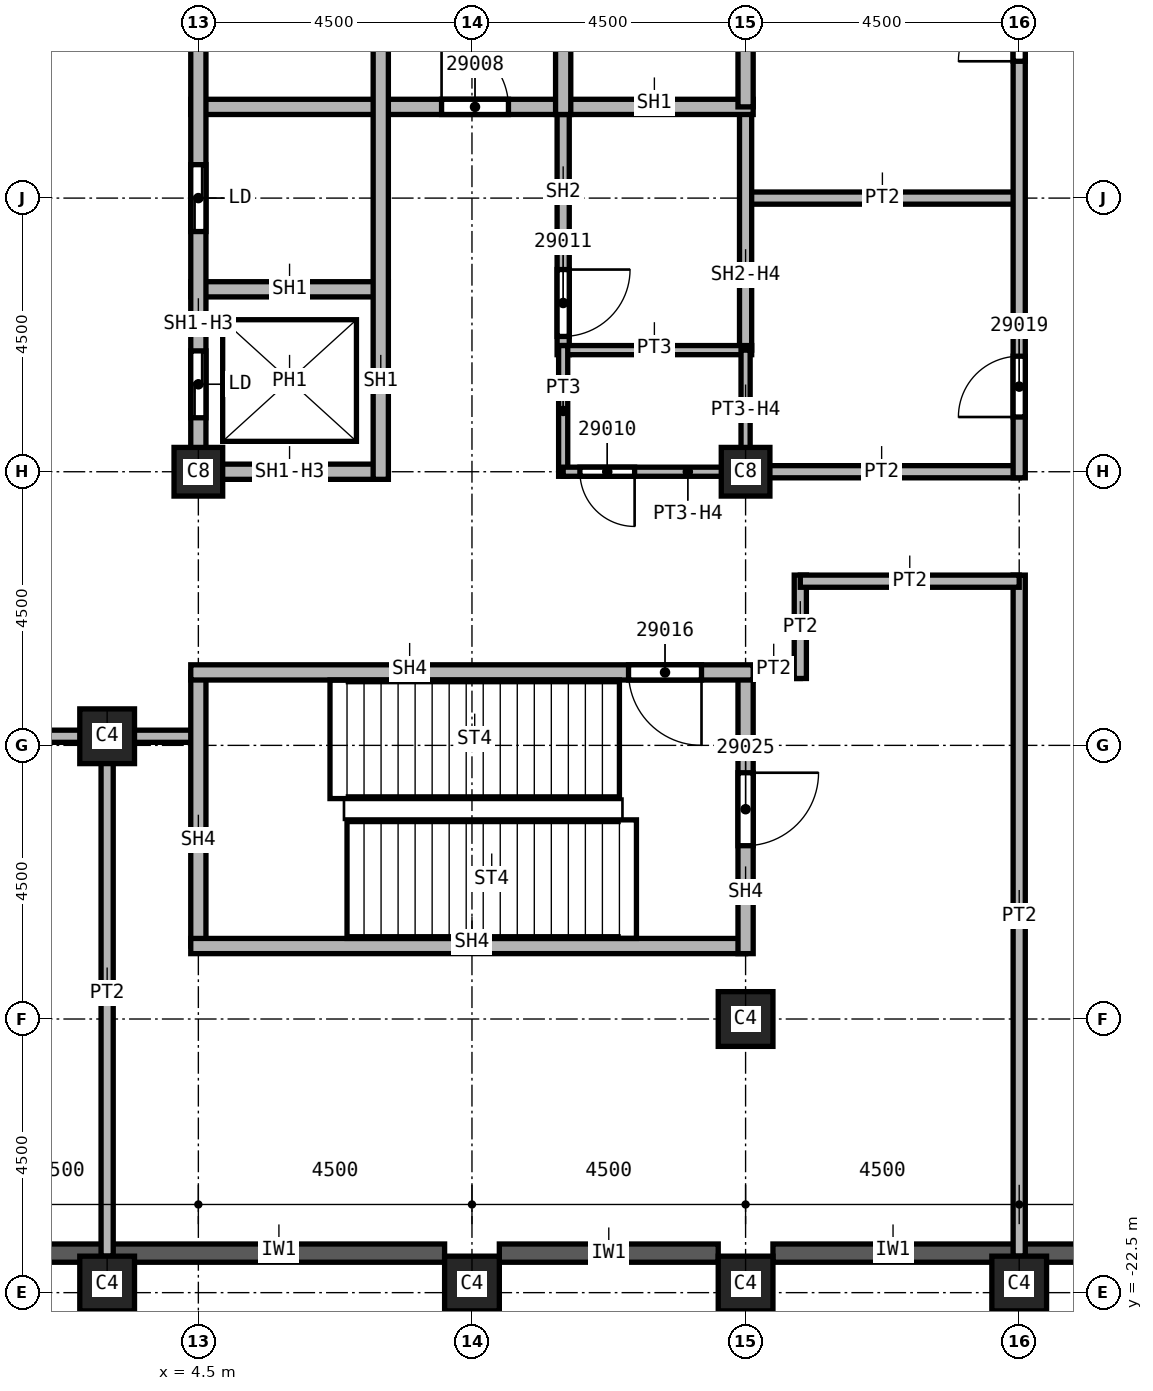
"""IFC4 building model, lengths in metres.
Left out: names, types, materials, properties, quantities, classifications, styles, units other than length and angle.
Written with IfcOpenShell. Run it as: python <this file> out.ifc"""

import sys

from ifc_helpers import new_model, si_unit, direction, frame, frame_2d, origin, origin_2d, place, context, subcontext, project, spatial, rectangle, extrude, element, fill, save


model = new_model("IFC4")
c1 = context("Model", 3, precision=1e-05, world=origin(), true_north=direction((0.0, 1.0)))
c2 = subcontext(c1, "Body", "Model", "MODEL_VIEW")
j1 = project(units=[si_unit("LENGTHUNIT", "METRE"), si_unit("PLANEANGLEUNIT", "RADIAN")], contexts=[c1])
p1 = place(None, origin())
s1 = spatial("IfcSite", under=j1, at=p1, CompositionType="ELEMENT")
p2 = place(p1, origin())
s2 = spatial("IfcBuilding", under=s1, at=p2, CompositionType="ELEMENT")
p3 = place(p2, frame((0.0, 0.0, 294.0)))
s3 = spatial("IfcBuildingStorey", under=s2, at=p3, CompositionType="ELEMENT", Elevation=294.0)
p4 = place(p3, frame((13.5, -18.0, 0.0), z_axis=(0.0, 0.0, 1.0), x_axis=(1.0, 0.0, 0.0)))
e1 = element("IfcColumn", 1, at=p4, inside=s3, PredefinedType="COLUMN", context=c2, shape_type="SweptSolid", body=[
    extrude(rectangle(XDim=0.9, YDim=0.9, at=origin_2d()), origin(), (0.0, 0.0, 1.0), 5.74),
])
for number, where, z_axis, x_axis in (
    (2, (4.5, -9.0, 0.0), (0.0, 0.0, 1.0), (1.0, 0.0, 0.0)),
    (3, (13.5, -9.0, 0.0), (0.0, 0.0, 1.0), (1.0, 0.0, 0.0)),
):
    element("IfcColumn", number, at=place(p3, frame(where, z_axis=z_axis, x_axis=x_axis)), inside=s3, PredefinedType="COLUMN", context=c2, shape_type="SweptSolid", body=[
        extrude(rectangle(XDim=0.8, YDim=0.8, at=origin_2d()), origin(), (0.0, 0.0, 1.0), 5.74),
    ])
for number, where, z_axis, x_axis in (
    (4, (3.0, -22.35, 0.0), (0.0, -0.18, 0.984), (1.0, 0.0, 0.0)),
    (5, (9.0, -22.35, 0.0), (0.0, -0.18, 0.984), (1.0, 0.0, 0.0)),
    (6, (13.5, -22.35, 0.0), (0.0, -0.18, 0.984), (1.0, 0.0, 0.0)),
    (7, (18.0, -22.35, 0.0), (0.0, -0.18, 0.984), (1.0, 0.0, 0.0)),
    (8, (3.0, -13.35, 0.0), (0.0, -0.18, 0.984), (1.0, 0.0, 0.0)),
):
    element("IfcColumn", number, at=place(p3, frame(where, z_axis=z_axis, x_axis=x_axis)), inside=s3, PredefinedType="COLUMN", context=c2, shape_type="SweptSolid", body=[
        extrude(rectangle(XDim=0.9, YDim=0.9, at=origin_2d()), origin(), (0.0, 0.0, 1.0), 5.835),
    ])
for number, where, z_axis, x_axis in (
    (9, (-2.55, -21.85, 0.0), (0.0, 0.0, 1.0), (1.0, 0.0, 0.0)),
    (10, (3.05, -21.85, 0.0), (0.0, 0.0, 1.0), (1.0, 0.0, 0.0)),
):
    element("IfcWall", number, at=place(p3, frame(where, z_axis=z_axis, x_axis=x_axis)), inside=s3, PredefinedType="SOLIDWALL", context=c2, shape_type="SweptSolid", body=[
        extrude(rectangle(XDim=5.5, YDim=0.3, at=frame_2d((2.75, 0.0))), origin(), (0.0, 0.0, 1.0), 5.14),
    ])
p5 = place(p3, frame((9.45, -21.85, 0.0), z_axis=(0.0, 0.0, 1.0), x_axis=(1.0, 0.0, 0.0)))
e11 = element("IfcWall", 11, at=p5, inside=s3, PredefinedType="SOLIDWALL", context=c2, shape_type="SweptSolid", body=[
    extrude(rectangle(XDim=3.6, YDim=0.3, at=frame_2d((1.8, 0.0))), origin(), (0.0, 0.0, 1.0), 5.14),
])
for number, where, z_axis, x_axis in (
    (12, (13.95, -21.85, 0.0), (0.0, 0.0, 1.0), (1.0, 0.0, 0.0)),
    (13, (18.05, -21.85, 0.0), (0.0, 0.0, 1.0), (1.0, 0.0, 0.0)),
):
    element("IfcWall", number, at=place(p3, frame(where, z_axis=z_axis, x_axis=x_axis)), inside=s3, PredefinedType="SOLIDWALL", context=c2, shape_type="SweptSolid", body=[
        extrude(rectangle(XDim=4.0, YDim=0.3, at=frame_2d((2.0, 0.0))), origin(), (0.0, 0.0, 1.0), 5.14),
    ])
p6 = place(p3, frame((4.5, -13.35, 0.0), z_axis=(0.0, 0.0, 1.0), x_axis=(-1.0, 0.0, 0.0)))
e14 = element("IfcWall", 14, at=p6, inside=s3, PredefinedType="PARTITIONING", context=c2, shape_type="SweptSolid", body=[
    extrude(rectangle(XDim=9.0, YDim=0.2, at=frame_2d((4.5, 0.0))), origin(), (0.0, 0.0, 1.0), 5.74),
])
p7 = place(p3, frame((3.0, -13.35, 0.0), z_axis=(0.0, 0.0, 1.0), x_axis=(0.0, -1.0, 0.0)))
e15 = element("IfcWall", 15, at=p7, inside=s3, PredefinedType="PARTITIONING", context=c2, shape_type="SweptSolid", body=[
    extrude(rectangle(XDim=8.55, YDim=0.2, at=frame_2d((4.275, 0.0))), origin(), (0.0, 0.0, 1.0), 5.74),
])
for number, where, z_axis, x_axis in (
    (16, (13.5, -9.0, 0.0), (0.0, 0.0, 1.0), (1.0, 0.0, 0.0)),
    (17, (13.5, -4.5, 0.0), (0.0, 0.0, 1.0), (1.0, 0.0, 0.0)),
):
    element("IfcWall", number, at=place(p3, frame(where, z_axis=z_axis, x_axis=x_axis)), inside=s3, PredefinedType="PARTITIONING", context=c2, shape_type="SweptSolid", body=[
        extrude(rectangle(XDim=4.5, YDim=0.2, at=frame_2d((2.25, 0.0))), origin(), (0.0, 0.0, 1.0), 5.74),
    ])
p8 = place(p3, frame((14.4, -12.3, 0.0), z_axis=(0.0, 0.0, 1.0), x_axis=(-1.0, 0.0, 0.0)))
e18 = element("IfcWall", 18, at=p8, inside=s3, PredefinedType="PARTITIONING", context=c2, shape_type="SweptSolid", body=[
    extrude(rectangle(XDim=1.025, YDim=0.2, at=frame_2d((0.512, 0.0))), origin(), (0.0, 0.0, 1.0), 5.74),
])
p9 = place(p3, frame((14.4, -10.7, 0.0), z_axis=(0.0, 0.0, 1.0), x_axis=(0.0, -1.0, 0.0)))
e19 = element("IfcWall", 19, at=p9, inside=s3, PredefinedType="PARTITIONING", context=c2, shape_type="SweptSolid", body=[
    extrude(rectangle(XDim=1.7, YDim=0.2, at=frame_2d((0.85, 0.0))), origin(), (0.0, 0.0, 1.0), 5.74),
])
p10 = place(p3, frame((18.0, -21.9, 0.0), z_axis=(0.0, 0.0, 1.0), x_axis=(0.0, 1.0, 0.0)))
e20 = element("IfcWall", 20, at=p10, inside=s3, PredefinedType="PARTITIONING", context=c2, shape_type="SweptSolid", body=[
    extrude(rectangle(XDim=11.2, YDim=0.2, at=frame_2d((5.6, 0.0))), origin(), (0.0, 0.0, 1.0), 5.74),
])
p11 = place(p3, frame((18.0, -10.8, 0.0), z_axis=(0.0, 0.0, 1.0), x_axis=(-1.0, 0.0, 0.0)))
e21 = element("IfcWall", 21, at=p11, inside=s3, PredefinedType="PARTITIONING", context=c2, shape_type="SweptSolid", body=[
    extrude(rectangle(XDim=3.6, YDim=0.2, at=frame_2d((1.8, 0.0))), origin(), (0.0, 0.0, 1.0), 5.74),
])
p12 = place(p3, frame((18.0, -9.1, 0.0), z_axis=(0.0, 0.0, 1.0), x_axis=(0.0, 1.0, 0.0)))
e22 = element("IfcWall", 22, at=p12, inside=s3, PredefinedType="PARTITIONING", context=c2, shape_type="SweptSolid", body=[
    extrude(rectangle(XDim=18.2, YDim=0.2, at=frame_2d((9.1, 0.0))), origin(), (0.0, 0.0, 1.0), 5.74),
])
p13 = place(p12, frame((1.0, 0.0, 0.0)))
e23 = element("IfcOpeningElement", 23, at=p13, cuts=e22, PredefinedType="OPENING", context=c2, shape_type="SweptSolid", body=[
    extrude(rectangle(XDim=1.0, YDim=2.1, at=frame_2d((0.5, 1.05))), frame((0.0, 0.1, 0.0), z_axis=(0.0, -1.0, 0.0), x_axis=(1.0, 0.0, 0.0)), (0.0, 0.0, 1.0), 0.2),
])
p14 = place(p12, frame((6.85, 0.0, 0.0)))
e24 = element("IfcOpeningElement", 24, at=p14, cuts=e22, PredefinedType="OPENING", context=c2, shape_type="SweptSolid", body=[
    extrude(rectangle(XDim=1.0, YDim=2.1, at=frame_2d((0.5, 1.05))), frame((0.0, 0.1, 0.0), z_axis=(0.0, -1.0, 0.0), x_axis=(1.0, 0.0, 0.0)), (0.0, 0.0, 1.0), 0.2),
])
p15 = place(p12, frame((13.75, 0.0, 0.0)))
e25 = element("IfcOpeningElement", 25, at=p15, cuts=e22, PredefinedType="OPENING", context=c2, shape_type="SweptSolid", body=[
    extrude(rectangle(XDim=1.0, YDim=2.1, at=frame_2d((0.5, 1.05))), frame((0.0, 0.1, 0.0), z_axis=(0.0, -1.0, 0.0), x_axis=(1.0, 0.0, 0.0)), (0.0, 0.0, 1.0), 0.2),
])
p16 = place(p3, frame((10.5, -2.875, 0.0), z_axis=(0.0, 0.0, 1.0), x_axis=(0.0, -1.0, 0.0)))
e26 = element("IfcWall", 26, at=p16, inside=s3, PredefinedType="SOLIDWALL", context=c2, shape_type="SweptSolid", body=[
    extrude(rectangle(XDim=4.2, YDim=0.2, at=frame_2d((2.1, 0.0))), origin(), (0.0, 0.0, 1.0), 5.74),
])
p17 = place(p16, frame((2.8, 0.0, 0.0)))
e27 = element("IfcOpeningElement", 27, at=p17, cuts=e26, PredefinedType="OPENING", context=c2, shape_type="SweptSolid", body=[
    extrude(rectangle(XDim=1.1, YDim=2.1, at=frame_2d((0.55, 1.05))), frame((0.0, 0.1, 0.0), z_axis=(0.0, -1.0, 0.0), x_axis=(1.0, 0.0, 0.0)), (0.0, 0.0, 1.0), 0.2),
])
p18 = place(p3, frame((13.5, -3.0, 0.0), z_axis=(0.0, 0.0, 1.0), x_axis=(0.0, -1.0, 0.0)))
e28 = element("IfcWall", 28, at=p18, inside=s3, PredefinedType="SOLIDWALL", context=c2, shape_type="SweptSolid", body=[
    extrude(rectangle(XDim=4.0, YDim=0.2, at=frame_2d((2.0, 0.0))), origin(), (0.0, 0.0, 1.0), 5.062),
])
p19 = place(p3, frame((4.375, -6.0, 0.0), z_axis=(0.0, 0.0, 1.0), x_axis=(1.0, 0.0, 0.0)))
e29 = element("IfcWall", 29, at=p19, inside=s3, PredefinedType="SOLIDWALL", context=c2, shape_type="SweptSolid", body=[
    extrude(rectangle(XDim=3.25, YDim=0.25, at=frame_2d((1.625, 0.0))), origin(), (0.0, 0.0, 1.0), 5.74),
])
p20 = place(p3, frame((4.375, -3.0, 0.0), z_axis=(0.0, 0.0, 1.0), x_axis=(1.0, 0.0, 0.0)))
e30 = element("IfcWall", 30, at=p20, inside=s3, PredefinedType="SOLIDWALL", context=c2, shape_type="SweptSolid", body=[
    extrude(rectangle(XDim=9.25, YDim=0.25, at=frame_2d((4.625, 0.0))), origin(), (0.0, 0.0, 1.0), 5.74),
])
p21 = place(p20, frame((4.125, 0.0, 0.0)))
e31 = element("IfcOpeningElement", 31, at=p21, cuts=e30, PredefinedType="OPENING", context=c2, shape_type="SweptSolid", body=[
    extrude(rectangle(XDim=1.1, YDim=2.1, at=frame_2d((0.55, 1.05))), frame((0.0, 0.125, 0.0), z_axis=(0.0, -1.0, 0.0), x_axis=(1.0, 0.0, 0.0)), (0.0, 0.0, 1.0), 0.25),
])
p22 = place(p3, frame((4.5, -9.125, 0.0), z_axis=(0.0, 0.0, 1.0), x_axis=(0.0, 1.0, 0.0)))
e32 = element("IfcWall", 32, at=p22, inside=s3, PredefinedType="SOLIDWALL", context=c2, shape_type="SweptSolid", body=[
    extrude(rectangle(XDim=9.125, YDim=0.25, at=frame_2d((4.562, 0.0))), origin(), (0.0, 0.0, 1.0), 5.062),
])
p23 = place(p22, frame((1.012, 0.0, 0.0)))
e33 = element("IfcOpeningElement", 33, at=p23, cuts=e32, PredefinedType="OPENING", context=c2, shape_type="SweptSolid", body=[
    extrude(rectangle(XDim=1.1, YDim=2.1, at=frame_2d((0.55, 1.05))), frame((0.0, 0.125, 0.0), z_axis=(0.0, -1.0, 0.0), x_axis=(1.0, 0.0, 0.0)), (0.0, 0.0, 1.0), 0.25),
])
p24 = place(p22, frame((4.075, 0.0, 0.0)))
e34 = element("IfcOpeningElement", 34, at=p24, cuts=e32, PredefinedType="OPENING", context=c2, shape_type="SweptSolid", body=[
    extrude(rectangle(XDim=1.1, YDim=2.1, at=frame_2d((0.55, 1.05))), frame((0.0, 0.125, 0.0), z_axis=(0.0, -1.0, 0.0), x_axis=(1.0, 0.0, 0.0)), (0.0, 0.0, 1.0), 0.25),
])
p25 = place(p22, frame((7.075, 0.0, 0.0)))
e35 = element("IfcOpeningElement", 35, at=p25, cuts=e32, PredefinedType="OPENING", context=c2, shape_type="SweptSolid", body=[
    extrude(rectangle(XDim=1.1, YDim=2.1, at=frame_2d((0.55, 1.05))), frame((0.0, 0.125, 0.0), z_axis=(0.0, -1.0, 0.0), x_axis=(1.0, 0.0, 0.0)), (0.0, 0.0, 1.0), 0.25),
])
p26 = place(p3, frame((7.5, -9.0, 0.0), z_axis=(0.0, 0.0, 1.0), x_axis=(-1.0, 0.0, 0.0)))
e36 = element("IfcWall", 36, at=p26, inside=s3, PredefinedType="SOLIDWALL", context=c2, shape_type="SweptSolid", body=[
    extrude(rectangle(XDim=3.0, YDim=0.25, at=frame_2d((1.5, 0.0))), origin(), (0.0, 0.0, 1.0), 5.062),
])
p27 = place(p3, frame((7.5, 3.125, 0.0), z_axis=(0.0, 0.0, 1.0), x_axis=(0.0, -1.0, 0.0)))
e37 = element("IfcWall", 37, at=p27, inside=s3, PredefinedType="SOLIDWALL", context=c2, shape_type="SweptSolid", body=[
    extrude(rectangle(XDim=12.25, YDim=0.25, at=frame_2d((6.125, 0.0))), origin(), (0.0, 0.0, 1.0), 5.74),
])
p28 = place(p3, frame((10.5, 6.125, 0.0), z_axis=(0.0, 0.0, 1.0), x_axis=(0.0, -1.0, 0.0)))
e38 = element("IfcWall", 38, at=p28, inside=s3, PredefinedType="SOLIDWALL", context=c2, shape_type="SweptSolid", body=[
    extrude(rectangle(XDim=9.25, YDim=0.25, at=frame_2d((4.625, 0.0))), origin(), (0.0, 0.0, 1.0), 5.74),
])
p29 = place(p28, frame((7.075, 0.0, 0.0)))
e39 = element("IfcOpeningElement", 39, at=p29, cuts=e38, PredefinedType="OPENING", context=c2, shape_type="SweptSolid", body=[
    extrude(rectangle(XDim=1.1, YDim=2.1, at=frame_2d((0.55, 1.05))), frame((0.0, 0.125, 0.0), z_axis=(0.0, -1.0, 0.0), x_axis=(1.0, 0.0, 0.0)), (0.0, 0.0, 1.0), 0.25),
])
p30 = place(p28, frame((4.075, 0.0, 0.0)))
e40 = element("IfcOpeningElement", 40, at=p30, cuts=e38, PredefinedType="OPENING", context=c2, shape_type="SweptSolid", body=[
    extrude(rectangle(XDim=1.1, YDim=2.1, at=frame_2d((0.55, 1.05))), frame((0.0, 0.125, 0.0), z_axis=(0.0, -1.0, 0.0), x_axis=(1.0, 0.0, 0.0)), (0.0, 0.0, 1.0), 0.25),
])
p31 = place(p3, frame((13.5, 6.0, 0.0), z_axis=(0.0, 0.0, 1.0), x_axis=(0.0, -1.0, 0.0)))
e41 = element("IfcWall", 41, at=p31, inside=s3, PredefinedType="SOLIDWALL", context=c2, shape_type="SweptSolid", body=[
    extrude(rectangle(XDim=9.0, YDim=0.25, at=frame_2d((4.5, 0.0))), origin(), (0.0, 0.0, 1.0), 5.062),
])
p32 = place(p3, frame((4.5, -16.8, 0.0), z_axis=(0.0, 0.0, 1.0), x_axis=(0.0, 1.0, 0.0)))
e42 = element("IfcWall", 42, at=p32, inside=s3, PredefinedType="SOLIDWALL", context=c2, shape_type="SweptSolid", body=[
    extrude(rectangle(XDim=4.5, YDim=0.25, at=frame_2d((2.25, 0.0))), origin(), (0.0, 0.0, 1.0), 5.74),
])
p33 = place(p3, frame((13.5, -16.8, 0.0), z_axis=(0.0, 0.0, 1.0), x_axis=(-1.0, 0.0, 0.0)))
e43 = element("IfcWall", 43, at=p33, inside=s3, PredefinedType="SOLIDWALL", context=c2, shape_type="SweptSolid", body=[
    extrude(rectangle(XDim=9.125, YDim=0.25, at=frame_2d((4.562, 0.0))), origin(), (0.0, 0.0, 1.0), 5.74),
])
p34 = place(p3, frame((13.5, -12.3, 0.0), z_axis=(0.0, 0.0, 1.0), x_axis=(0.0, -1.0, 0.0)))
e44 = element("IfcWall", 44, at=p34, inside=s3, PredefinedType="SOLIDWALL", context=c2, shape_type="SweptSolid", body=[
    extrude(rectangle(XDim=4.625, YDim=0.25, at=frame_2d((2.312, 0.0))), origin(), (0.0, 0.0, 1.0), 5.74),
])
p35 = place(p34, frame((1.65, 0.0, 0.0)))
e45 = element("IfcOpeningElement", 45, at=p35, cuts=e44, PredefinedType="OPENING", context=c2, shape_type="SweptSolid", body=[
    extrude(rectangle(XDim=1.2, YDim=2.1, at=frame_2d((0.6, 1.05))), frame((0.0, 0.125, 0.0), z_axis=(0.0, -1.0, 0.0), x_axis=(1.0, 0.0, 0.0)), (0.0, 0.0, 1.0), 0.25),
])
p36 = place(p3, frame((13.625, -12.3, 0.0), z_axis=(0.0, 0.0, 1.0), x_axis=(-1.0, 0.0, 0.0)))
e46 = element("IfcWall", 46, at=p36, inside=s3, PredefinedType="SOLIDWALL", context=c2, shape_type="SweptSolid", body=[
    extrude(rectangle(XDim=9.25, YDim=0.25, at=frame_2d((4.625, 0.0))), origin(), (0.0, 0.0, 1.0), 5.74),
])
p37 = place(p36, frame((0.85, 0.0, 0.0)))
e47 = element("IfcOpeningElement", 47, at=p37, cuts=e46, PredefinedType="OPENING", context=c2, shape_type="SweptSolid", body=[
    extrude(rectangle(XDim=1.2, YDim=2.1, at=frame_2d((0.6, 1.05))), frame((0.0, 0.125, 0.0), z_axis=(0.0, -1.0, 0.0), x_axis=(1.0, 0.0, 0.0)), (0.0, 0.0, 1.0), 0.25),
])
p38 = place(p3, frame((10.5, -7.0, 0.0), z_axis=(0.0, 0.0, 1.0), x_axis=(1.0, 0.0, 0.0)))
e48 = element("IfcWall", 48, at=p38, inside=s3, PredefinedType="PARTITIONING", context=c2, shape_type="SweptSolid", body=[
    extrude(rectangle(XDim=3.1, YDim=0.15, at=frame_2d((1.55, 0.0))), origin(), (0.0, 0.0, 1.0), 5.74),
])
p39 = place(p3, frame((10.5, -6.925, 0.0), z_axis=(0.0, 0.0, 1.0), x_axis=(0.0, -1.0, 0.0)))
e49 = element("IfcWall", 49, at=p39, inside=s3, PredefinedType="PARTITIONING", context=c2, shape_type="SweptSolid", body=[
    extrude(rectangle(XDim=2.15, YDim=0.15, at=frame_2d((1.075, 0.0))), origin(), (0.0, 0.0, 1.0), 5.74),
])
p40 = place(p3, frame((13.5, -7.0, 0.0), z_axis=(0.0, 0.0, 1.0), x_axis=(0.0, -1.0, 0.0)))
e50 = element("IfcWall", 50, at=p40, inside=s3, PredefinedType="PARTITIONING", context=c2, shape_type="SweptSolid", body=[
    extrude(rectangle(XDim=2.1, YDim=0.15, at=frame_2d((1.05, 0.0))), origin(), (0.0, 0.0, 1.0), 5.062),
])
p41 = place(p3, frame((13.575, -9.0, 0.0), z_axis=(0.0, 0.0, 1.0), x_axis=(-1.0, 0.0, 0.0)))
e51 = element("IfcWall", 51, at=p41, inside=s3, PredefinedType="PARTITIONING", context=c2, shape_type="SweptSolid", body=[
    extrude(rectangle(XDim=3.075, YDim=0.15, at=frame_2d((1.538, 0.0))), origin(), (0.0, 0.0, 1.0), 5.062),
])
p42 = place(p41, frame((1.9, 0.0, 0.0)))
e52 = element("IfcOpeningElement", 52, at=p42, cuts=e51, PredefinedType="OPENING", context=c2, shape_type="SweptSolid", body=[
    extrude(rectangle(XDim=0.9, YDim=2.1, at=frame_2d((0.45, 1.05))), frame((0.0, 0.075, 0.0), z_axis=(0.0, -1.0, 0.0), x_axis=(1.0, 0.0, 0.0)), (0.0, 0.0, 1.0), 0.15),
])
p43 = place(p21, origin())
e53 = element("IfcDoor", 53, at=p43, inside=s3, OperationType="SINGLE_SWING_LEFT", PredefinedType="DOOR", context=c2, shape_type="SweptSolid", body=[
    extrude(rectangle(XDim=1.1, YDim=2.1, at=frame_2d((0.55, 1.05))), frame((0.0, 0.025, 0.0), z_axis=(0.0, -1.0, 0.0), x_axis=(1.0, 0.0, 0.0)), (0.0, 0.0, 1.0), 0.05),
])
fill(e31, e53)
p44 = place(p42, origin())
e54 = element("IfcDoor", 54, at=p44, inside=s3, OperationType="SINGLE_SWING_LEFT", PredefinedType="DOOR", context=c2, shape_type="SweptSolid", body=[
    extrude(rectangle(XDim=0.9, YDim=2.1, at=frame_2d((0.45, 1.05))), frame((0.0, 0.025, 0.0), z_axis=(0.0, -1.0, 0.0), x_axis=(1.0, 0.0, 0.0)), (0.0, 0.0, 1.0), 0.05),
])
fill(e52, e54)
p45 = place(p17, origin())
e55 = element("IfcDoor", 55, at=p45, inside=s3, OperationType="SINGLE_SWING_RIGHT", PredefinedType="DOOR", context=c2, shape_type="SweptSolid", body=[
    extrude(rectangle(XDim=1.1, YDim=2.1, at=frame_2d((0.55, 1.05))), frame((0.0, 0.025, 0.0), z_axis=(0.0, -1.0, 0.0), x_axis=(1.0, 0.0, 0.0)), (0.0, 0.0, 1.0), 0.05),
])
fill(e27, e55)
p46 = place(p37, origin())
e56 = element("IfcDoor", 56, at=p46, inside=s3, OperationType="SINGLE_SWING_LEFT", PredefinedType="DOOR", context=c2, shape_type="SweptSolid", body=[
    extrude(rectangle(XDim=1.2, YDim=2.1, at=frame_2d((0.6, 1.05))), frame((0.0, 0.025, 0.0), z_axis=(0.0, -1.0, 0.0), x_axis=(1.0, 0.0, 0.0)), (0.0, 0.0, 1.0), 0.05),
])
fill(e47, e56)
p47 = place(p13, origin())
e57 = element("IfcDoor", 57, at=p47, inside=s3, OperationType="SINGLE_SWING_RIGHT", PredefinedType="DOOR", context=c2, shape_type="SweptSolid", body=[
    extrude(rectangle(XDim=1.0, YDim=2.1, at=frame_2d((0.5, 1.05))), frame((0.0, 0.025, 0.0), z_axis=(0.0, -1.0, 0.0), x_axis=(1.0, 0.0, 0.0)), (0.0, 0.0, 1.0), 0.05),
])
fill(e23, e57)
p48 = place(p14, origin())
e58 = element("IfcDoor", 58, at=p48, inside=s3, OperationType="SINGLE_SWING_LEFT", PredefinedType="DOOR", context=c2, shape_type="SweptSolid", body=[
    extrude(rectangle(XDim=1.0, YDim=2.1, at=frame_2d((0.5, 1.05))), frame((0.0, 0.025, 0.0), z_axis=(0.0, -1.0, 0.0), x_axis=(1.0, 0.0, 0.0)), (0.0, 0.0, 1.0), 0.05),
])
fill(e24, e58)
p49 = place(p35, origin())
e59 = element("IfcDoor", 59, at=p49, inside=s3, OperationType="SINGLE_SWING_RIGHT", PredefinedType="DOOR", context=c2, shape_type="SweptSolid", body=[
    extrude(rectangle(XDim=1.2, YDim=2.1, at=frame_2d((0.6, 1.05))), frame((0.0, 0.025, 0.0), z_axis=(0.0, -1.0, 0.0), x_axis=(1.0, 0.0, 0.0)), (0.0, 0.0, 1.0), 0.05),
])
fill(e45, e59)
p50 = place(p23, origin())
e60 = element("IfcDoor", 60, at=p50, inside=s3, OperationType="SLIDING_TO_LEFT", PredefinedType="DOOR", context=c2, shape_type="SweptSolid", body=[
    extrude(rectangle(XDim=1.1, YDim=2.1, at=frame_2d((0.55, 1.05))), frame((0.0, 0.025, 0.0), z_axis=(0.0, -1.0, 0.0), x_axis=(1.0, 0.0, 0.0)), (0.0, 0.0, 1.0), 0.05),
])
fill(e33, e60)
p51 = place(p24, origin())
e61 = element("IfcDoor", 61, at=p51, inside=s3, OperationType="SLIDING_TO_LEFT", PredefinedType="DOOR", context=c2, shape_type="SweptSolid", body=[
    extrude(rectangle(XDim=1.1, YDim=2.1, at=frame_2d((0.55, 1.05))), frame((0.0, 0.025, 0.0), z_axis=(0.0, -1.0, 0.0), x_axis=(1.0, 0.0, 0.0)), (0.0, 0.0, 1.0), 0.05),
])
fill(e34, e61)
save(model, sys.argv[1])
